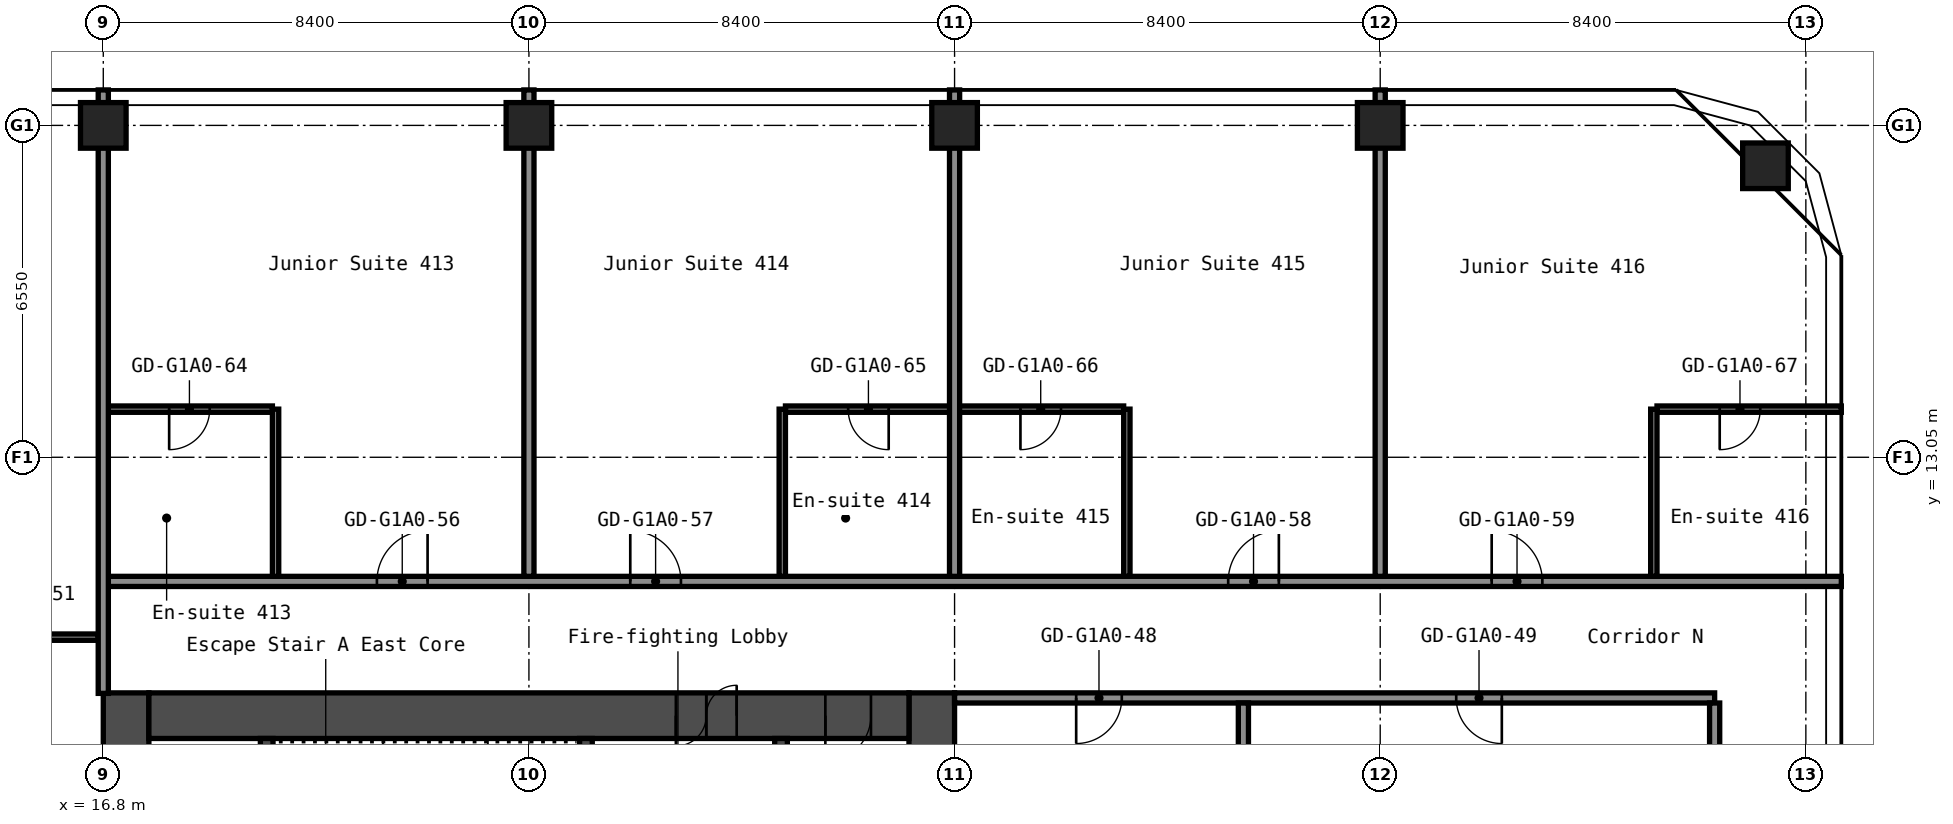
"""IFC4 building model, lengths in metres.
Left out: names, types, materials, properties, quantities, classifications, styles, units other than length and angle.
Written with IfcOpenShell. Run it as: python <this file> out.ifc"""

import sys

from ifc_helpers import new_model, si_unit, direction, frame, frame_2d, origin, origin_2d, place, context, subcontext, project, spatial, rectangle, hollow_rectangle, extrude, element, fill, save


model = new_model("IFC4")
c1 = context("Model", 3, precision=1e-05, world=origin(), true_north=direction((0.0, 1.0)))
c2 = subcontext(c1, "Body", "Model", "MODEL_VIEW")
j1 = project(units=[si_unit("LENGTHUNIT", "METRE"), si_unit("PLANEANGLEUNIT", "RADIAN")], contexts=[c1])
p1 = place(None, origin())
s1 = spatial("IfcSite", under=j1, at=p1, CompositionType="ELEMENT")
p2 = place(p1, origin())
s2 = spatial("IfcBuilding", under=s1, at=p2, CompositionType="ELEMENT")
p3 = place(p2, frame((0.0, 0.0, 19.8)))
s3 = spatial("IfcBuildingStorey", under=s2, at=p3, CompositionType="ELEMENT", Elevation=19.8)
for number, where, z_axis, x_axis in (
    (1, (16.8, 19.6, 0.0), (0.0, 0.0, 1.0), (1.0, 0.0, 0.0)),
    (2, (25.2, 19.6, 0.0), (0.0, 0.0, 1.0), (1.0, 0.0, 0.0)),
    (3, (33.6, 19.6, 0.0), (0.0, 0.0, 1.0), (1.0, 0.0, 0.0)),
    (4, (42.0, 19.6, 0.0), (0.0, 0.0, 1.0), (1.0, 0.0, 0.0)),
    (5, (49.603, 18.803, 0.0), (0.0, 0.0, 1.0), (1.0, 0.0, 0.0)),
):
    element("IfcColumn", number, at=place(p3, frame(where, z_axis=z_axis, x_axis=x_axis)), inside=s3, PredefinedType="COLUMN", context=c2, shape_type="SweptSolid", body=[
        extrude(hollow_rectangle(XDim=0.9, YDim=0.9, WallThickness=0.036, at=origin_2d()), origin(), (0.0, 0.0, 1.0), 2.8),
    ])
p4 = place(p3, frame((17.25, -8.4, 0.0), z_axis=(0.0, 0.0, 1.0), x_axis=(0.0, 1.0, 0.0)))
e6 = element("IfcWall", 6, at=p4, inside=s3, PredefinedType="SHEAR", context=c2, shape_type="SweptSolid", body=[
    extrude(rectangle(XDim=16.8, YDim=0.9, at=frame_2d((8.4, 0.0))), origin(), (0.0, 0.0, 1.0), 2.8),
])
p5 = place(p4, frame((12.75, 0.0, 0.0)))
e7 = element("IfcOpeningElement", 7, at=p5, cuts=e6, PredefinedType="OPENING", context=c2, shape_type="SweptSolid", body=[
    extrude(rectangle(XDim=1.2, YDim=2.1, at=frame_2d((0.6, 1.05))), frame((0.0, 0.46, 0.0), z_axis=(0.0, -1.0, 0.0), x_axis=(1.0, 0.0, 0.0)), (0.0, 0.0, 1.0), 0.92),
])
p6 = place(p4, frame((2.85, 0.0, 0.0)))
e8 = element("IfcOpeningElement", 8, at=p6, cuts=e6, PredefinedType="OPENING", context=c2, shape_type="SweptSolid", body=[
    extrude(rectangle(XDim=1.2, YDim=2.1, at=frame_2d((0.6, 1.05))), frame((0.0, 0.46, 0.0), z_axis=(0.0, -1.0, 0.0), x_axis=(1.0, 0.0, 0.0)), (0.0, 0.0, 1.0), 0.92),
])
p7 = place(p3, frame((33.15, -8.4, 0.0), z_axis=(0.0, 0.0, 1.0), x_axis=(0.0, 1.0, 0.0)))
e9 = element("IfcWall", 9, at=p7, inside=s3, PredefinedType="SHEAR", context=c2, shape_type="SweptSolid", body=[
    extrude(rectangle(XDim=16.8, YDim=0.9, at=frame_2d((8.4, 0.0))), origin(), (0.0, 0.0, 1.0), 2.8),
])
p8 = place(p3, frame((17.7, 7.95, 0.0), z_axis=(0.0, 0.0, 1.0), x_axis=(1.0, 0.0, 0.0)))
e10 = element("IfcWall", 10, at=p8, inside=s3, PredefinedType="SHEAR", context=c2, shape_type="SweptSolid", body=[
    extrude(rectangle(XDim=15.0, YDim=0.9, at=frame_2d((7.5, 0.0))), origin(), (0.0, 0.0, 1.0), 2.8),
])
p9 = place(p8, frame((10.4, 0.0, 0.0)))
e11 = element("IfcOpeningElement", 11, at=p9, cuts=e10, PredefinedType="OPENING", context=c2, shape_type="SweptSolid", body=[
    extrude(rectangle(XDim=1.2, YDim=2.1, at=frame_2d((0.6, 1.05))), frame((0.0, 0.46, 0.0), z_axis=(0.0, -1.0, 0.0), x_axis=(1.0, 0.0, 0.0)), (0.0, 0.0, 1.0), 0.92),
])
p10 = place(p8, frame((13.35, 0.0, 0.0)))
e12 = element("IfcOpeningElement", 12, at=p10, cuts=e10, PredefinedType="OPENING", context=c2, shape_type="SweptSolid", body=[
    extrude(rectangle(XDim=0.9, YDim=2.1, at=frame_2d((0.45, 1.05))), frame((0.0, 0.46, 0.0), z_axis=(0.0, -1.0, 0.0), x_axis=(1.0, 0.0, 0.0)), (0.0, 0.0, 1.0), 0.92),
])
p11 = place(p3, frame((20.025, 1.2, 0.0), z_axis=(0.0, 0.0, 1.0), x_axis=(0.0, 1.0, 0.0)))
e13 = element("IfcWall", 13, at=p11, inside=s3, PredefinedType="SHEAR", context=c2, shape_type="SweptSolid", body=[
    extrude(rectangle(XDim=6.3, YDim=0.25, at=frame_2d((3.15, 0.0))), origin(), (0.0, 0.0, 1.0), 2.8),
])
p12 = place(p3, frame((26.325, 3.75, 0.0), z_axis=(0.0, 0.0, 1.0), x_axis=(0.0, 1.0, 0.0)))
e14 = element("IfcWall", 14, at=p12, inside=s3, PredefinedType="SHEAR", context=c2, shape_type="SweptSolid", body=[
    extrude(rectangle(XDim=3.75, YDim=0.25, at=frame_2d((1.875, 0.0))), origin(), (0.0, 0.0, 1.0), 2.8),
])
p13 = place(p12, frame((1.25, 0.0, 0.0)))
e15 = element("IfcOpeningElement", 15, at=p13, cuts=e14, PredefinedType="OPENING", context=c2, shape_type="SweptSolid", body=[
    extrude(rectangle(XDim=1.2, YDim=2.1, at=frame_2d((0.6, 1.05))), frame((0.0, 0.135, 0.0), z_axis=(0.0, -1.0, 0.0), x_axis=(1.0, 0.0, 0.0)), (0.0, 0.0, 1.0), 0.27),
])
p14 = place(p3, frame((30.175, 1.45, 0.0), z_axis=(0.0, 0.0, 1.0), x_axis=(0.0, 1.0, 0.0)))
e16 = element("IfcWall", 16, at=p14, inside=s3, PredefinedType="SHEAR", context=c2, shape_type="SweptSolid", body=[
    extrude(rectangle(XDim=6.05, YDim=0.25, at=frame_2d((3.025, 0.0))), origin(), (0.0, 0.0, 1.0), 2.8),
])
p15 = place(p14, frame((2.625, 0.0, 0.0)))
e17 = element("IfcOpeningElement", 17, at=p15, cuts=e16, PredefinedType="OPENING", context=c2, shape_type="SweptSolid", body=[
    extrude(rectangle(XDim=1.1, YDim=2.1, at=frame_2d((0.55, 1.05))), frame((0.0, 0.135, 0.0), z_axis=(0.0, -1.0, 0.0), x_axis=(1.0, 0.0, 0.0)), (0.0, 0.0, 1.0), 0.27),
])
p16 = place(p3, frame((33.6, 8.3, 0.0), z_axis=(0.0, 0.0, 1.0), x_axis=(1.0, 0.0, 0.0)))
e18 = element("IfcWall", 18, at=p16, inside=s3, PredefinedType="PARTITIONING", context=c2, shape_type="SweptSolid", body=[
    extrude(rectangle(XDim=15.0, YDim=0.2, at=frame_2d((7.5, 0.0))), origin(), (0.0, 0.0, 1.0), 2.8),
])
p17 = place(p16, frame((2.4, 0.0, 0.0)))
e19 = element("IfcOpeningElement", 19, at=p17, cuts=e18, PredefinedType="OPENING", context=c2, shape_type="SweptSolid", body=[
    extrude(rectangle(XDim=0.9, YDim=2.1, at=frame_2d((0.45, 1.05))), frame((0.0, 0.11, 0.0), z_axis=(0.0, -1.0, 0.0), x_axis=(1.0, 0.0, 0.0)), (0.0, 0.0, 1.0), 0.22),
])
p18 = place(p16, frame((9.9, 0.0, 0.0)))
e20 = element("IfcOpeningElement", 20, at=p18, cuts=e18, PredefinedType="OPENING", context=c2, shape_type="SweptSolid", body=[
    extrude(rectangle(XDim=0.9, YDim=2.1, at=frame_2d((0.45, 1.05))), frame((0.0, 0.11, 0.0), z_axis=(0.0, -1.0, 0.0), x_axis=(1.0, 0.0, 0.0)), (0.0, 0.0, 1.0), 0.22),
])
p19 = place(p3, frame((13.462, 9.5, 0.0), z_axis=(0.0, 0.0, 1.0), x_axis=(1.0, 0.0, 0.0)))
e21 = element("IfcWall", 21, at=p19, inside=s3, PredefinedType="PARTITIONING", context=c2, shape_type="SweptSolid", body=[
    extrude(rectangle(XDim=3.238, YDim=0.125, at=frame_2d((1.619, 0.0))), origin(), (0.0, 0.0, 1.0), 2.8),
])
p20 = place(p19, frame((1.238, 0.0, 0.0)))
e22 = element("IfcOpeningElement", 22, at=p20, cuts=e21, PredefinedType="OPENING", context=c2, shape_type="SweptSolid", body=[
    extrude(rectangle(XDim=0.8, YDim=2.1, at=frame_2d((0.4, 1.05))), frame((0.0, 0.073, 0.0), z_axis=(0.0, -1.0, 0.0), x_axis=(1.0, 0.0, 0.0)), (0.0, 0.0, 1.0), 0.145),
])
p21 = place(p3, frame((16.8, 10.6, 0.0), z_axis=(0.0, 0.0, 1.0), x_axis=(1.0, 0.0, 0.0)))
e23 = element("IfcWall", 23, at=p21, inside=s3, PredefinedType="PARTITIONING", context=c2, shape_type="SweptSolid", body=[
    extrude(rectangle(XDim=34.3, YDim=0.2, at=frame_2d((17.15, 0.0))), origin(), (0.0, 0.0, 1.0), 2.8),
])
p22 = place(p21, frame((5.4, 0.0, 0.0)))
e24 = element("IfcOpeningElement", 24, at=p22, cuts=e23, PredefinedType="OPENING", context=c2, shape_type="SweptSolid", body=[
    extrude(rectangle(XDim=1.0, YDim=2.1, at=frame_2d((0.5, 1.05))), frame((0.0, 0.11, 0.0), z_axis=(0.0, -1.0, 0.0), x_axis=(1.0, 0.0, 0.0)), (0.0, 0.0, 1.0), 0.22),
])
p23 = place(p21, frame((10.4, 0.0, 0.0)))
e25 = element("IfcOpeningElement", 25, at=p23, cuts=e23, PredefinedType="OPENING", context=c2, shape_type="SweptSolid", body=[
    extrude(rectangle(XDim=1.0, YDim=2.1, at=frame_2d((0.5, 1.05))), frame((0.0, 0.11, 0.0), z_axis=(0.0, -1.0, 0.0), x_axis=(1.0, 0.0, 0.0)), (0.0, 0.0, 1.0), 0.22),
])
p24 = place(p21, frame((22.2, 0.0, 0.0)))
e26 = element("IfcOpeningElement", 26, at=p24, cuts=e23, PredefinedType="OPENING", context=c2, shape_type="SweptSolid", body=[
    extrude(rectangle(XDim=1.0, YDim=2.1, at=frame_2d((0.5, 1.05))), frame((0.0, 0.11, 0.0), z_axis=(0.0, -1.0, 0.0), x_axis=(1.0, 0.0, 0.0)), (0.0, 0.0, 1.0), 0.22),
])
p25 = place(p21, frame((27.4, 0.0, 0.0)))
e27 = element("IfcOpeningElement", 27, at=p25, cuts=e23, PredefinedType="OPENING", context=c2, shape_type="SweptSolid", body=[
    extrude(rectangle(XDim=1.0, YDim=2.1, at=frame_2d((0.5, 1.05))), frame((0.0, 0.11, 0.0), z_axis=(0.0, -1.0, 0.0), x_axis=(1.0, 0.0, 0.0)), (0.0, 0.0, 1.0), 0.22),
])
p26 = place(p3, frame((16.9, 14.0, 0.0), z_axis=(0.0, 0.0, 1.0), x_axis=(1.0, 0.0, 0.0)))
e28 = element("IfcWall", 28, at=p26, inside=s3, PredefinedType="PARTITIONING", context=c2, shape_type="SweptSolid", body=[
    extrude(rectangle(XDim=3.238, YDim=0.125, at=frame_2d((1.619, 0.0))), origin(), (0.0, 0.0, 1.0), 2.8),
])
p27 = place(p26, frame((1.2, 0.0, 0.0)))
e29 = element("IfcOpeningElement", 29, at=p27, cuts=e28, PredefinedType="OPENING", context=c2, shape_type="SweptSolid", body=[
    extrude(rectangle(XDim=0.8, YDim=2.1, at=frame_2d((0.4, 1.05))), frame((0.0, 0.073, 0.0), z_axis=(0.0, -1.0, 0.0), x_axis=(1.0, 0.0, 0.0)), (0.0, 0.0, 1.0), 0.145),
])
p28 = place(p3, frame((30.262, 14.0, 0.0), z_axis=(0.0, 0.0, 1.0), x_axis=(1.0, 0.0, 0.0)))
e30 = element("IfcWall", 30, at=p28, inside=s3, PredefinedType="PARTITIONING", context=c2, shape_type="SweptSolid", body=[
    extrude(rectangle(XDim=6.675, YDim=0.125, at=frame_2d((3.337, 0.0))), origin(), (0.0, 0.0, 1.0), 2.8),
])
p29 = place(p28, frame((1.238, 0.0, 0.0)))
e31 = element("IfcOpeningElement", 31, at=p29, cuts=e30, PredefinedType="OPENING", context=c2, shape_type="SweptSolid", body=[
    extrude(rectangle(XDim=0.8, YDim=2.1, at=frame_2d((0.4, 1.05))), frame((0.0, 0.073, 0.0), z_axis=(0.0, -1.0, 0.0), x_axis=(1.0, 0.0, 0.0)), (0.0, 0.0, 1.0), 0.145),
])
p30 = place(p28, frame((4.637, 0.0, 0.0)))
e32 = element("IfcOpeningElement", 32, at=p30, cuts=e30, PredefinedType="OPENING", context=c2, shape_type="SweptSolid", body=[
    extrude(rectangle(XDim=0.8, YDim=2.1, at=frame_2d((0.4, 1.05))), frame((0.0, 0.073, 0.0), z_axis=(0.0, -1.0, 0.0), x_axis=(1.0, 0.0, 0.0)), (0.0, 0.0, 1.0), 0.145),
])
p31 = place(p3, frame((47.462, 14.0, 0.0), z_axis=(0.0, 0.0, 1.0), x_axis=(1.0, 0.0, 0.0)))
e33 = element("IfcWall", 33, at=p31, inside=s3, PredefinedType="PARTITIONING", context=c2, shape_type="SweptSolid", body=[
    extrude(rectangle(XDim=3.638, YDim=0.125, at=frame_2d((1.819, 0.0))), origin(), (0.0, 0.0, 1.0), 2.8),
])
p32 = place(p31, frame((1.238, 0.0, 0.0)))
e34 = element("IfcOpeningElement", 34, at=p32, cuts=e33, PredefinedType="OPENING", context=c2, shape_type="SweptSolid", body=[
    extrude(rectangle(XDim=0.8, YDim=2.1, at=frame_2d((0.4, 1.05))), frame((0.0, 0.073, 0.0), z_axis=(0.0, -1.0, 0.0), x_axis=(1.0, 0.0, 0.0)), (0.0, 0.0, 1.0), 0.145),
])
p33 = place(p3, frame((16.8, 8.39, 0.0), z_axis=(0.0, 0.0, 1.0), x_axis=(0.0, 1.0, 0.0)))
e35 = element("IfcWall", 35, at=p33, inside=s3, PredefinedType="PARTITIONING", context=c2, shape_type="SweptSolid", body=[
    extrude(rectangle(XDim=11.91, YDim=0.2, at=frame_2d((5.955, 0.0))), origin(), (0.0, 0.0, 1.0), 2.8),
])
p34 = place(p3, frame((20.2, 10.7, 0.0), z_axis=(0.0, 0.0, 1.0), x_axis=(0.0, 1.0, 0.0)))
e36 = element("IfcWall", 36, at=p34, inside=s3, PredefinedType="PARTITIONING", context=c2, shape_type="SweptSolid", body=[
    extrude(rectangle(XDim=3.3, YDim=0.125, at=frame_2d((1.65, 0.0))), origin(), (0.0, 0.0, 1.0), 2.8),
])
p35 = place(p3, frame((25.2, 10.7, 0.0), z_axis=(0.0, 0.0, 1.0), x_axis=(0.0, 1.0, 0.0)))
e37 = element("IfcWall", 37, at=p35, inside=s3, PredefinedType="PARTITIONING", context=c2, shape_type="SweptSolid", body=[
    extrude(rectangle(XDim=9.6, YDim=0.2, at=frame_2d((4.8, 0.0))), origin(), (0.0, 0.0, 1.0), 2.8),
])
p36 = place(p3, frame((30.2, 10.7, 0.0), z_axis=(0.0, 0.0, 1.0), x_axis=(0.0, 1.0, 0.0)))
e38 = element("IfcWall", 38, at=p36, inside=s3, PredefinedType="PARTITIONING", context=c2, shape_type="SweptSolid", body=[
    extrude(rectangle(XDim=3.3, YDim=0.125, at=frame_2d((1.65, 0.0))), origin(), (0.0, 0.0, 1.0), 2.8),
])
p37 = place(p3, frame((33.6, 10.7, 0.0), z_axis=(0.0, 0.0, 1.0), x_axis=(0.0, 1.0, 0.0)))
e39 = element("IfcWall", 39, at=p37, inside=s3, PredefinedType="PARTITIONING", context=c2, shape_type="SweptSolid", body=[
    extrude(rectangle(XDim=9.6, YDim=0.2, at=frame_2d((4.8, 0.0))), origin(), (0.0, 0.0, 1.0), 2.8),
])
p38 = place(p3, frame((37.0, 10.7, 0.0), z_axis=(0.0, 0.0, 1.0), x_axis=(0.0, 1.0, 0.0)))
e40 = element("IfcWall", 40, at=p38, inside=s3, PredefinedType="PARTITIONING", context=c2, shape_type="SweptSolid", body=[
    extrude(rectangle(XDim=3.3, YDim=0.125, at=frame_2d((1.65, 0.0))), origin(), (0.0, 0.0, 1.0), 2.8),
])
p39 = place(p3, frame((39.3, 0.0, 0.0), z_axis=(0.0, 0.0, 1.0), x_axis=(0.0, 1.0, 0.0)))
e41 = element("IfcWall", 41, at=p39, inside=s3, PredefinedType="PARTITIONING", context=c2, shape_type="SweptSolid", body=[
    extrude(rectangle(XDim=8.2, YDim=0.2, at=frame_2d((4.1, 0.0))), origin(), (0.0, 0.0, 1.0), 2.8),
])
p40 = place(p3, frame((42.0, 10.7, 0.0), z_axis=(0.0, 0.0, 1.0), x_axis=(0.0, 1.0, 0.0)))
e42 = element("IfcWall", 42, at=p40, inside=s3, PredefinedType="PARTITIONING", context=c2, shape_type="SweptSolid", body=[
    extrude(rectangle(XDim=9.6, YDim=0.2, at=frame_2d((4.8, 0.0))), origin(), (0.0, 0.0, 1.0), 2.8),
])
p41 = place(p3, frame((47.4, 10.7, 0.0), z_axis=(0.0, 0.0, 1.0), x_axis=(0.0, 1.0, 0.0)))
e43 = element("IfcWall", 43, at=p41, inside=s3, PredefinedType="PARTITIONING", context=c2, shape_type="SweptSolid", body=[
    extrude(rectangle(XDim=3.3, YDim=0.125, at=frame_2d((1.65, 0.0))), origin(), (0.0, 0.0, 1.0), 2.8),
])
p42 = place(p3, frame((48.6, -8.2, 0.0), z_axis=(0.0, 0.0, 1.0), x_axis=(0.0, 1.0, 0.0)))
e44 = element("IfcWall", 44, at=p42, inside=s3, PredefinedType="PARTITIONING", context=c2, shape_type="SweptSolid", body=[
    extrude(rectangle(XDim=16.4, YDim=0.2, at=frame_2d((8.2, 0.0))), origin(), (0.0, 0.0, 1.0), 2.8),
])
p43 = place(p9, origin())
e45 = element("IfcDoor", 45, at=p43, inside=s3, OperationType="DOUBLE_DOOR_SINGLE_SWING", PredefinedType="DOOR", context=c2, shape_type="SweptSolid", body=[
    extrude(rectangle(XDim=1.2, YDim=2.1, at=frame_2d((0.6, 1.05))), frame((0.0, 0.025, 0.0), z_axis=(0.0, -1.0, 0.0), x_axis=(1.0, 0.0, 0.0)), (0.0, 0.0, 1.0), 0.05),
])
fill(e11, e45)
p44 = place(p10, origin())
e46 = element("IfcDoor", 46, at=p44, inside=s3, OperationType="SINGLE_SWING_LEFT", PredefinedType="DOOR", context=c2, shape_type="SweptSolid", body=[
    extrude(rectangle(XDim=0.9, YDim=2.1, at=frame_2d((0.45, 1.05))), frame((0.0, 0.025, 0.0), z_axis=(0.0, -1.0, 0.0), x_axis=(1.0, 0.0, 0.0)), (0.0, 0.0, 1.0), 0.05),
])
fill(e12, e46)
p45 = place(p17, origin())
e47 = element("IfcDoor", 47, at=p45, inside=s3, OperationType="SINGLE_SWING_LEFT", PredefinedType="DOOR", context=c2, shape_type="SweptSolid", body=[
    extrude(rectangle(XDim=0.9, YDim=2.1, at=frame_2d((0.45, 1.05))), frame((0.0, 0.025, 0.0), z_axis=(0.0, -1.0, 0.0), x_axis=(1.0, 0.0, 0.0)), (0.0, 0.0, 1.0), 0.05),
])
fill(e19, e47)
p46 = place(p18, origin())
e48 = element("IfcDoor", 48, at=p46, inside=s3, OperationType="SINGLE_SWING_RIGHT", PredefinedType="DOOR", context=c2, shape_type="SweptSolid", body=[
    extrude(rectangle(XDim=0.9, YDim=2.1, at=frame_2d((0.45, 1.05))), frame((0.0, 0.025, 0.0), z_axis=(0.0, -1.0, 0.0), x_axis=(1.0, 0.0, 0.0)), (0.0, 0.0, 1.0), 0.05),
])
fill(e20, e48)
p47 = place(p22, origin())
e49 = element("IfcDoor", 49, at=p47, inside=s3, OperationType="SINGLE_SWING_LEFT", PredefinedType="DOOR", context=c2, shape_type="SweptSolid", body=[
    extrude(rectangle(XDim=1.0, YDim=2.1, at=frame_2d((0.5, 1.05))), frame((0.0, 0.025, 0.0), z_axis=(0.0, -1.0, 0.0), x_axis=(1.0, 0.0, 0.0)), (0.0, 0.0, 1.0), 0.05),
])
fill(e24, e49)
p48 = place(p23, origin())
e50 = element("IfcDoor", 50, at=p48, inside=s3, OperationType="SINGLE_SWING_RIGHT", PredefinedType="DOOR", context=c2, shape_type="SweptSolid", body=[
    extrude(rectangle(XDim=1.0, YDim=2.1, at=frame_2d((0.5, 1.05))), frame((0.0, 0.025, 0.0), z_axis=(0.0, -1.0, 0.0), x_axis=(1.0, 0.0, 0.0)), (0.0, 0.0, 1.0), 0.05),
])
fill(e25, e50)
p49 = place(p24, origin())
e51 = element("IfcDoor", 51, at=p49, inside=s3, OperationType="SINGLE_SWING_LEFT", PredefinedType="DOOR", context=c2, shape_type="SweptSolid", body=[
    extrude(rectangle(XDim=1.0, YDim=2.1, at=frame_2d((0.5, 1.05))), frame((0.0, 0.025, 0.0), z_axis=(0.0, -1.0, 0.0), x_axis=(1.0, 0.0, 0.0)), (0.0, 0.0, 1.0), 0.05),
])
fill(e26, e51)
p50 = place(p25, origin())
e52 = element("IfcDoor", 52, at=p50, inside=s3, OperationType="SINGLE_SWING_RIGHT", PredefinedType="DOOR", context=c2, shape_type="SweptSolid", body=[
    extrude(rectangle(XDim=1.0, YDim=2.1, at=frame_2d((0.5, 1.05))), frame((0.0, 0.025, 0.0), z_axis=(0.0, -1.0, 0.0), x_axis=(1.0, 0.0, 0.0)), (0.0, 0.0, 1.0), 0.05),
])
fill(e27, e52)
p51 = place(p27, origin())
e53 = element("IfcDoor", 53, at=p51, inside=s3, OperationType="SINGLE_SWING_LEFT", PredefinedType="DOOR", context=c2, shape_type="SweptSolid", body=[
    extrude(rectangle(XDim=0.8, YDim=2.1, at=frame_2d((0.4, 1.05))), frame((0.0, 0.025, 0.0), z_axis=(0.0, -1.0, 0.0), x_axis=(1.0, 0.0, 0.0)), (0.0, 0.0, 1.0), 0.05),
])
fill(e29, e53)
p52 = place(p29, origin())
e54 = element("IfcDoor", 54, at=p52, inside=s3, OperationType="SINGLE_SWING_RIGHT", PredefinedType="DOOR", context=c2, shape_type="SweptSolid", body=[
    extrude(rectangle(XDim=0.8, YDim=2.1, at=frame_2d((0.4, 1.05))), frame((0.0, 0.025, 0.0), z_axis=(0.0, -1.0, 0.0), x_axis=(1.0, 0.0, 0.0)), (0.0, 0.0, 1.0), 0.05),
])
fill(e31, e54)
p53 = place(p30, origin())
e55 = element("IfcDoor", 55, at=p53, inside=s3, OperationType="SINGLE_SWING_LEFT", PredefinedType="DOOR", context=c2, shape_type="SweptSolid", body=[
    extrude(rectangle(XDim=0.8, YDim=2.1, at=frame_2d((0.4, 1.05))), frame((0.0, 0.025, 0.0), z_axis=(0.0, -1.0, 0.0), x_axis=(1.0, 0.0, 0.0)), (0.0, 0.0, 1.0), 0.05),
])
fill(e32, e55)
p54 = place(p32, origin())
e56 = element("IfcDoor", 56, at=p54, inside=s3, OperationType="SINGLE_SWING_LEFT", PredefinedType="DOOR", context=c2, shape_type="SweptSolid", body=[
    extrude(rectangle(XDim=0.8, YDim=2.1, at=frame_2d((0.4, 1.05))), frame((0.0, 0.025, 0.0), z_axis=(0.0, -1.0, 0.0), x_axis=(1.0, 0.0, 0.0)), (0.0, 0.0, 1.0), 0.05),
])
fill(e34, e56)
save(model, sys.argv[1])
